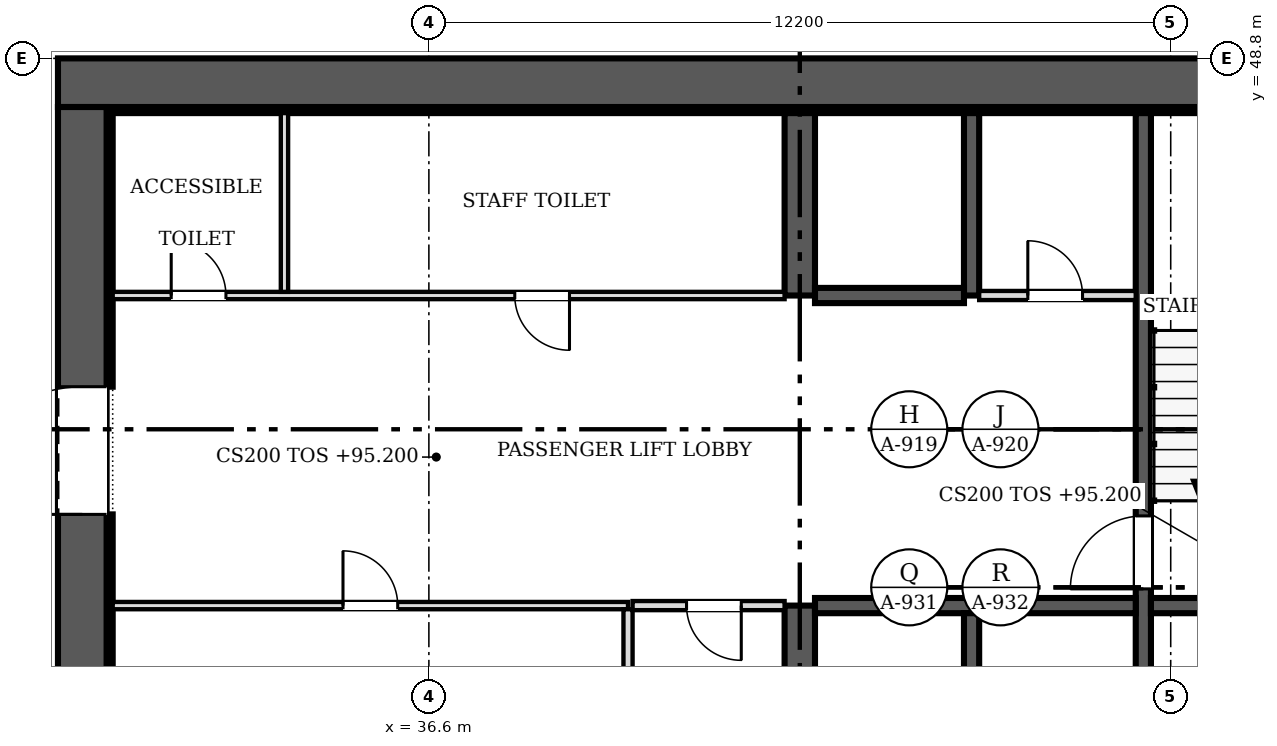
"""IFC4 building model, lengths in metres.
Left out: names, types, materials, properties, quantities, classifications, styles, units other than length and angle.
Written with IfcOpenShell. Run it as: python <this file> out.ifc"""

import sys

from ifc_helpers import new_model, si_unit, direction, frame, frame_2d, origin, place, context, subcontext, project, spatial, rectangle, extrude, source, transform, mapped, element, fill, save


model = new_model("IFC4")
c1 = context("Model", 3, precision=1e-05, world=origin(), true_north=direction((0.0, 1.0)))
c2 = subcontext(c1, "Body", "Model", "MODEL_VIEW")
j1 = project(units=[si_unit("LENGTHUNIT", "METRE"), si_unit("PLANEANGLEUNIT", "RADIAN")], contexts=[c1])
p1 = place(None, origin())
s1 = spatial("IfcSite", under=j1, at=p1, CompositionType="ELEMENT")
p2 = place(p1, origin())
s2 = spatial("IfcBuilding", under=s1, at=p2, CompositionType="ELEMENT")
p3 = place(p2, frame((0.0, 0.0, 95.2)))
s3 = spatial("IfcBuildingStorey", under=s2, at=p3, CompositionType="ELEMENT", Elevation=95.2)
p4 = place(p3, frame((30.9, 25.2, 0.0), z_axis=(0.0, 0.0, 1.0), x_axis=(0.0, 1.0, 0.0)))
e1 = element("IfcWall", 1, at=p4, inside=s3, PredefinedType="SHEAR", context=c2, shape_type="SweptSolid", body=[
    extrude(rectangle(XDim=22.8, YDim=0.8, at=frame_2d((11.4, 0.0))), origin(), (0.0, 0.0, 1.0), 3.8),
])
m1 = source(origin(), c2, "Body", "SweptSolid", [
    extrude(rectangle(XDim=2.1, YDim=2.4, at=frame_2d((1.05, 1.2))), frame((0.0, 0.41, 0.0), z_axis=(0.0, -1.0, 0.0), x_axis=(1.0, 0.0, 0.0)), (0.0, 0.0, 1.0), 0.82),
])
p5 = place(p4, frame((4.6, 0.0, 0.0)))
e2 = element("IfcOpeningElement", 2, at=p5, cuts=e1, PredefinedType="OPENING", context=c2, shape_type="MappedRepresentation", body=[
    mapped(m1, transform((0.0, 0.0, 0.0), scale=1.0)),
])
p6 = place(p4, frame((16.1, 0.0, 0.0)))
e3 = element("IfcOpeningElement", 3, at=p6, cuts=e1, PredefinedType="OPENING", context=c2, shape_type="MappedRepresentation", body=[
    mapped(m1, transform((0.0, 0.0, 0.0), scale=1.0)),
])
p7 = place(p3, frame((30.5, 48.4, 0.0), z_axis=(0.0, 0.0, 1.0), x_axis=(1.0, 0.0, 0.0)))
e4 = element("IfcWall", 4, at=p7, inside=s3, PredefinedType="SHEAR", context=c2, shape_type="SweptSolid", body=[
    extrude(rectangle(XDim=24.4, YDim=0.8, at=frame_2d((12.2, 0.0))), origin(), (0.0, 0.0, 1.0), 3.8),
])
p8 = place(p3, frame((31.3, 47.95, 0.0), z_axis=(0.0, 0.0, 1.0), x_axis=(1.0, 0.0, 0.0)))
e5 = element("IfcWall", 5, at=p8, inside=s3, PredefinedType="SOLIDWALL", context=c2, shape_type="SweptSolid", body=[
    extrude(rectangle(XDim=22.8, YDim=0.1, at=frame_2d((11.4, 0.0))), origin(), (0.0, 0.0, 1.0), 3.8),
])
p9 = place(p3, frame((31.35, 31.9, 0.0), z_axis=(0.0, 0.0, 1.0), x_axis=(0.0, 1.0, 0.0)))
e6 = element("IfcWall", 6, at=p9, inside=s3, PredefinedType="SOLIDWALL", context=c2, shape_type="SweptSolid", body=[
    extrude(rectangle(XDim=9.4, YDim=0.1, at=frame_2d((4.7, 0.0))), origin(), (0.0, 0.0, 1.0), 3.8),
])
p10 = place(p3, frame((31.35, 43.4, 0.0), z_axis=(0.0, 0.0, 1.0), x_axis=(0.0, 1.0, 0.0)))
e7 = element("IfcWall", 7, at=p10, inside=s3, PredefinedType="SOLIDWALL", context=c2, shape_type="SweptSolid", body=[
    extrude(rectangle(XDim=4.5, YDim=0.1, at=frame_2d((2.25, 0.0))), origin(), (0.0, 0.0, 1.0), 3.8),
])
p11 = place(p3, frame((42.7, 36.85, 0.0), z_axis=(0.0, 0.0, 1.0), x_axis=(0.0, 1.0, 0.0)))
e8 = element("IfcWall", 8, at=p11, inside=s3, PredefinedType="SHEAR", context=c2, shape_type="SweptSolid", body=[
    extrude(rectangle(XDim=2.95, YDim=0.5, at=frame_2d((1.475, 0.0))), origin(), (0.0, 0.0, 1.0), 3.8),
])
p12 = place(p3, frame((42.7, 44.9, 0.0), z_axis=(0.0, 0.0, 1.0), x_axis=(0.0, 1.0, 0.0)))
e9 = element("IfcWall", 9, at=p12, inside=s3, PredefinedType="SHEAR", context=c2, shape_type="SweptSolid", body=[
    extrude(rectangle(XDim=3.0, YDim=0.5, at=frame_2d((1.5, 0.0))), origin(), (0.0, 0.0, 1.0), 3.8),
])
p13 = place(p3, frame((48.35, 47.9, 0.0), z_axis=(0.0, 0.0, 1.0), x_axis=(0.0, -1.0, 0.0)))
e10 = element("IfcWall", 10, at=p13, inside=s3, PredefinedType="SOLIDWALL", context=c2, shape_type="SweptSolid", body=[
    extrude(rectangle(XDim=11.05, YDim=0.25, at=frame_2d((5.525, 0.0))), origin(), (0.0, 0.0, 1.0), 3.8),
])
m2 = source(origin(), c2, "Body", "SweptSolid", [
    extrude(rectangle(XDim=1.2, YDim=2.1, at=frame_2d((0.6, 1.05))), frame((0.0, 0.135, 0.0), z_axis=(0.0, -1.0, 0.0), x_axis=(1.0, 0.0, 0.0)), (0.0, 0.0, 1.0), 0.27),
])
p14 = place(p13, frame((6.625, 0.0, 0.0)))
e11 = element("IfcOpeningElement", 11, at=p14, cuts=e10, PredefinedType="OPENING", context=c2, shape_type="MappedRepresentation", body=[
    mapped(m2, transform((0.0, 0.0, 0.0), scale=1.0)),
])
p15 = place(p3, frame((42.95, 39.8, 0.0), z_axis=(0.0, 0.0, 1.0), x_axis=(1.0, 0.0, 0.0)))
e12 = element("IfcWall", 12, at=p15, inside=s3, PredefinedType="SOLIDWALL", context=c2, shape_type="SweptSolid", body=[
    extrude(rectangle(XDim=5.275, YDim=0.25, at=frame_2d((2.638, 0.0))), origin(), (0.0, 0.0, 1.0), 3.8),
])
p16 = place(p3, frame((48.475, 39.8, 0.0), z_axis=(0.0, 0.0, 1.0), x_axis=(1.0, 0.0, 0.0)))
e13 = element("IfcWall", 13, at=p16, inside=s3, PredefinedType="SOLIDWALL", context=c2, shape_type="SweptSolid", body=[
    extrude(rectangle(XDim=3.525, YDim=0.25, at=frame_2d((1.762, 0.0))), origin(), (0.0, 0.0, 1.0), 3.8),
])
p17 = place(p3, frame((45.525, 36.85, 0.0), z_axis=(0.0, 0.0, 1.0), x_axis=(0.0, 1.0, 0.0)))
e14 = element("IfcWall", 14, at=p17, inside=s3, PredefinedType="SOLIDWALL", context=c2, shape_type="SweptSolid", body=[
    extrude(rectangle(XDim=2.825, YDim=0.25, at=frame_2d((1.413, 0.0))), origin(), (0.0, 0.0, 1.0), 3.8),
])
p18 = place(p3, frame((45.525, 44.9, 0.0), z_axis=(0.0, 0.0, 1.0), x_axis=(0.0, 1.0, 0.0)))
e15 = element("IfcWall", 15, at=p18, inside=s3, PredefinedType="SOLIDWALL", context=c2, shape_type="SweptSolid", body=[
    extrude(rectangle(XDim=3.0, YDim=0.25, at=frame_2d((1.5, 0.0))), origin(), (0.0, 0.0, 1.0), 3.8),
])
p19 = place(p3, frame((42.95, 44.9, 0.0), z_axis=(0.0, 0.0, 1.0), x_axis=(1.0, 0.0, 0.0)))
e16 = element("IfcWall", 16, at=p19, inside=s3, PredefinedType="SOLIDWALL", context=c2, shape_type="SweptSolid", body=[
    extrude(rectangle(XDim=2.45, YDim=0.25, at=frame_2d((1.225, 0.0))), origin(), (0.0, 0.0, 1.0), 3.8),
])
p20 = place(p3, frame((31.4, 44.9, 0.0), z_axis=(0.0, 0.0, 1.0), x_axis=(1.0, 0.0, 0.0)))
e17 = element("IfcWall", 17, at=p20, inside=s3, PredefinedType="PARTITIONING", context=c2, shape_type="SweptSolid", body=[
    extrude(rectangle(XDim=11.05, YDim=0.12, at=frame_2d((5.525, 0.0))), origin(), (0.0, 0.0, 1.0), 3.6),
])
m3 = source(origin(), c2, "Body", "SweptSolid", [
    extrude(rectangle(XDim=0.9, YDim=2.1, at=frame_2d((0.45, 1.05))), frame((0.0, 0.07, 0.0), z_axis=(0.0, -1.0, 0.0), x_axis=(1.0, 0.0, 0.0)), (0.0, 0.0, 1.0), 0.14),
])
p21 = place(p20, frame((0.962, 0.0, 0.0)))
e18 = element("IfcOpeningElement", 18, at=p21, cuts=e17, PredefinedType="OPENING", context=c2, shape_type="MappedRepresentation", body=[
    mapped(m3, transform((0.0, 0.0, 0.0), scale=1.0)),
])
p22 = place(p20, frame((6.613, 0.0, 0.0)))
e19 = element("IfcOpeningElement", 19, at=p22, cuts=e17, PredefinedType="OPENING", context=c2, shape_type="MappedRepresentation", body=[
    mapped(m3, transform((0.0, 0.0, 0.0), scale=1.0)),
])
p23 = place(p3, frame((39.875, 39.8, 0.0), z_axis=(0.0, 0.0, 1.0), x_axis=(-1.0, 0.0, 0.0)))
e20 = element("IfcWall", 20, at=p23, inside=s3, PredefinedType="PARTITIONING", context=c2, shape_type="SweptSolid", body=[
    extrude(rectangle(XDim=8.475, YDim=0.12, at=frame_2d((4.238, 0.0))), origin(), (0.0, 0.0, 1.0), 3.6),
])
p24 = place(p23, frame((3.788, 0.0, 0.0)))
e21 = element("IfcOpeningElement", 21, at=p24, cuts=e20, PredefinedType="OPENING", context=c2, shape_type="MappedRepresentation", body=[
    mapped(m3, transform((0.0, 0.0, 0.0), scale=1.0)),
])
p25 = place(p3, frame((39.875, 36.85, 0.0), z_axis=(0.0, 0.0, 1.0), x_axis=(0.0, 1.0, 0.0)))
e22 = element("IfcWall", 22, at=p25, inside=s3, PredefinedType="PARTITIONING", context=c2, shape_type="SweptSolid", body=[
    extrude(rectangle(XDim=2.89, YDim=0.15, at=frame_2d((1.445, 0.0))), origin(), (0.0, 0.0, 1.0), 3.6),
])
p26 = place(p3, frame((34.225, 44.96, 0.0), z_axis=(0.0, 0.0, 1.0), x_axis=(0.0, 1.0, 0.0)))
e23 = element("IfcWall", 23, at=p26, inside=s3, PredefinedType="PARTITIONING", context=c2, shape_type="SweptSolid", body=[
    extrude(rectangle(XDim=2.94, YDim=0.12, at=frame_2d((1.47, 0.0))), origin(), (0.0, 0.0, 1.0), 3.6),
])
p27 = place(p3, frame((45.65, 44.9, 0.0), z_axis=(0.0, 0.0, 1.0), x_axis=(1.0, 0.0, 0.0)))
e24 = element("IfcWall", 24, at=p27, inside=s3, PredefinedType="PARTITIONING", context=c2, shape_type="SweptSolid", body=[
    extrude(rectangle(XDim=2.575, YDim=0.15, at=frame_2d((1.288, 0.0))), origin(), (0.0, 0.0, 1.0), 3.6),
])
m4 = source(origin(), c2, "Body", "SweptSolid", [
    extrude(rectangle(XDim=0.9, YDim=2.1, at=frame_2d((0.45, 1.05))), frame((0.0, 0.085, 0.0), z_axis=(0.0, -1.0, 0.0), x_axis=(1.0, 0.0, 0.0)), (0.0, 0.0, 1.0), 0.17),
])
p28 = place(p27, frame((0.8, 0.0, 0.0)))
e25 = element("IfcOpeningElement", 25, at=p28, cuts=e24, PredefinedType="OPENING", context=c2, shape_type="MappedRepresentation", body=[
    mapped(m4, transform((0.0, 0.0, 0.0), scale=1.0)),
])
p29 = place(p3, frame((42.45, 39.8, 0.0), z_axis=(0.0, 0.0, 1.0), x_axis=(-1.0, 0.0, 0.0)))
e26 = element("IfcWall", 26, at=p29, inside=s3, PredefinedType="PARTITIONING", context=c2, shape_type="SweptSolid", body=[
    extrude(rectangle(XDim=2.5, YDim=0.15, at=frame_2d((1.25, 0.0))), origin(), (0.0, 0.0, 1.0), 3.6),
])
p30 = place(p29, frame((0.712, 0.0, 0.0)))
e27 = element("IfcOpeningElement", 27, at=p30, cuts=e26, PredefinedType="OPENING", context=c2, shape_type="MappedRepresentation", body=[
    mapped(m4, transform((0.0, 0.0, 0.0), scale=1.0)),
])
m5 = source(origin(), c2, "Body", "SweptSolid", [
    extrude(rectangle(XDim=2.1, YDim=2.4, at=frame_2d((1.05, 1.2))), frame((0.0, 0.025, 0.0), z_axis=(0.0, -1.0, 0.0), x_axis=(1.0, 0.0, 0.0)), (0.0, 0.0, 1.0), 0.05),
])
p31 = place(p6, origin())
e28 = element("IfcDoor", 28, at=p31, inside=s3, OperationType="DOUBLE_DOOR_SINGLE_SWING", PredefinedType="DOOR", context=c2, shape_type="MappedRepresentation", body=[
    mapped(m5, transform((0.0, 0.0, 0.0), scale=1.0)),
])
fill(e3, e28)
m6 = source(origin(), c2, "Body", "SweptSolid", [
    extrude(rectangle(XDim=1.2, YDim=2.1, at=frame_2d((0.6, 1.05))), frame((0.0, 0.025, 0.0), z_axis=(0.0, -1.0, 0.0), x_axis=(1.0, 0.0, 0.0)), (0.0, 0.0, 1.0), 0.05),
])
p32 = place(p14, origin())
e29 = element("IfcDoor", 29, at=p32, inside=s3, OperationType="SINGLE_SWING_RIGHT", PredefinedType="DOOR", context=c2, shape_type="MappedRepresentation", body=[
    mapped(m6, transform((0.0, 0.0, 0.0), scale=1.0)),
])
fill(e11, e29)
m7 = source(origin(), c2, "Body", "SweptSolid", [
    extrude(rectangle(XDim=0.9, YDim=2.1, at=frame_2d((0.45, 1.05))), frame((0.0, 0.025, 0.0), z_axis=(0.0, -1.0, 0.0), x_axis=(1.0, 0.0, 0.0)), (0.0, 0.0, 1.0), 0.05),
])
p33 = place(p21, origin())
e30 = element("IfcDoor", 30, at=p33, inside=s3, OperationType="SINGLE_SWING_LEFT", PredefinedType="DOOR", context=c2, shape_type="MappedRepresentation", body=[
    mapped(m7, transform((0.0, 0.0, 0.0), scale=1.0)),
])
fill(e18, e30)
p34 = place(p22, origin())
e31 = element("IfcDoor", 31, at=p34, inside=s3, OperationType="SINGLE_SWING_RIGHT", PredefinedType="DOOR", context=c2, shape_type="MappedRepresentation", body=[
    mapped(m7, transform((0.0, 0.0, 0.0), scale=1.0)),
])
fill(e19, e31)
p35 = place(p24, origin())
e32 = element("IfcDoor", 32, at=p35, inside=s3, OperationType="SINGLE_SWING_RIGHT", PredefinedType="DOOR", context=c2, shape_type="MappedRepresentation", body=[
    mapped(m7, transform((0.0, 0.0, 0.0), scale=1.0)),
])
fill(e21, e32)
p36 = place(p28, origin())
e33 = element("IfcDoor", 33, at=p36, inside=s3, OperationType="SINGLE_SWING_LEFT", PredefinedType="DOOR", context=c2, shape_type="MappedRepresentation", body=[
    mapped(m7, transform((0.0, 0.0, 0.0), scale=1.0)),
])
fill(e25, e33)
p37 = place(p30, origin())
e34 = element("IfcDoor", 34, at=p37, inside=s3, OperationType="SINGLE_SWING_LEFT", PredefinedType="DOOR", context=c2, shape_type="MappedRepresentation", body=[
    mapped(m7, transform((0.0, 0.0, 0.0), scale=1.0)),
])
fill(e27, e34)
save(model, sys.argv[1])
